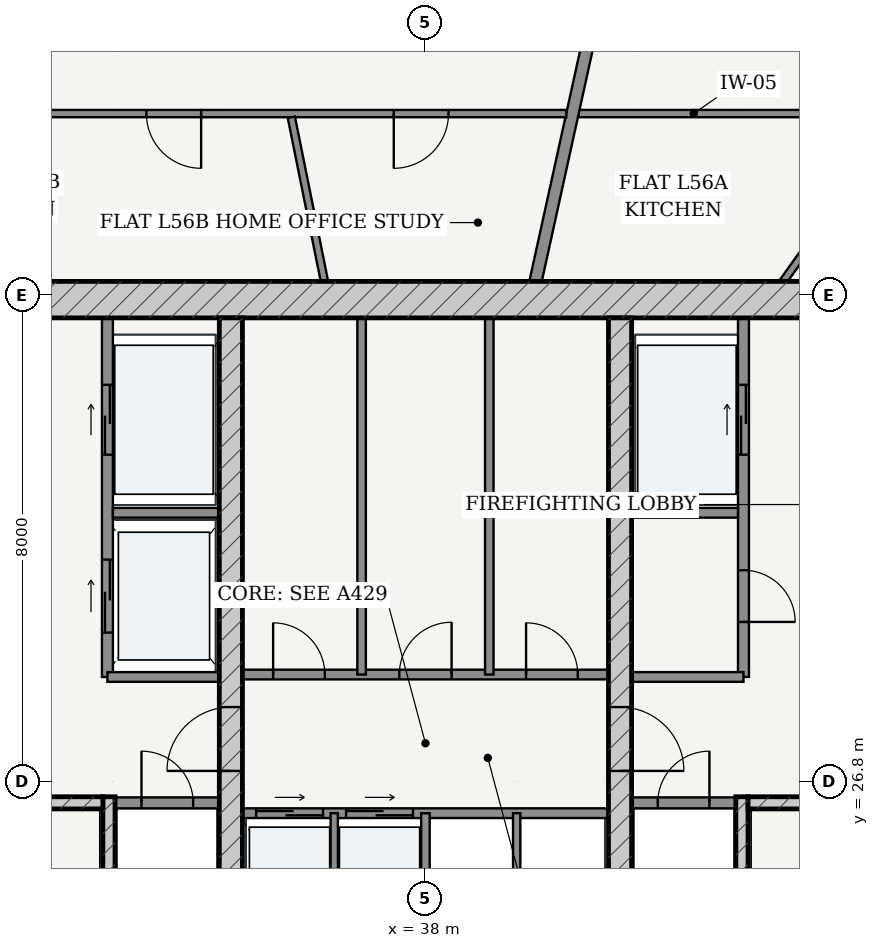
"""IFC4 building model, lengths in metres.
Left out: names, types, materials, properties, quantities, classifications, styles, units other than length and angle.
Written with IfcOpenShell. Run it as: python <this file> out.ifc"""

import sys

from ifc_helpers import new_model, si_unit, direction, frame, frame_2d, origin, place, context, subcontext, project, spatial, rectangle, extrude, source, transform, mapped, element, fill, save


model = new_model("IFC4")
c1 = context("Model", 3, precision=1e-05, world=origin(), true_north=direction((-0.2419218956, 0.970295726276)))
c2 = subcontext(c1, "Body", "Model", "MODEL_VIEW")
j1 = project(units=[si_unit("LENGTHUNIT", "METRE"), si_unit("PLANEANGLEUNIT", "RADIAN")], contexts=[c1])
p1 = place(None, origin())
s1 = spatial("IfcSite", under=j1, at=p1, CompositionType="ELEMENT")
p2 = place(p1, origin())
s2 = spatial("IfcBuilding", under=s1, at=p2, CompositionType="ELEMENT")
p3 = place(p2, frame((0.0, 0.0, 213.4)))
s3 = spatial("IfcBuildingStorey", under=s2, at=p3, CompositionType="ELEMENT", Elevation=213.4)
p4 = place(p3, frame((28.775, 34.725, 0.0), z_axis=(0.0, 0.0, 1.0), x_axis=(1.0, 0.0, 0.0)))
e1 = element("IfcWall", 1, at=p4, inside=s3, PredefinedType="SHEAR", context=c2, shape_type="SweptSolid", body=[
    extrude(rectangle(XDim=18.45, YDim=0.6, at=frame_2d((9.225, 0.0))), origin(), (0.0, 0.0, 1.0), 3.435),
])
p5 = place(p3, frame((32.795, 19.175, 0.0), z_axis=(0.0, 0.0, 1.0), x_axis=(0.0, 1.0, 0.0)))
e2 = element("IfcWall", 2, at=p5, inside=s3, PredefinedType="SOLIDWALL", context=c2, shape_type="SweptSolid", body=[
    extrude(rectangle(XDim=7.375, YDim=0.2, at=frame_2d((3.688, 0.0))), origin(), (0.0, 0.0, 1.0), 3.435),
])
p6 = place(p3, frame((29.375, 26.45, 0.0), z_axis=(0.0, 0.0, 1.0), x_axis=(1.0, 0.0, 0.0)))
e3 = element("IfcWall", 3, at=p6, inside=s3, PredefinedType="SOLIDWALL", context=c2, shape_type="SweptSolid", body=[
    extrude(rectangle(XDim=3.32, YDim=0.2, at=frame_2d((1.66, 0.0))), origin(), (0.0, 0.0, 1.0), 3.435),
])
p7 = place(p6, frame((1.185, 0.0, 0.0)))
e4 = element("IfcOpeningElement", 4, at=p7, cuts=e3, PredefinedType="OPENING", context=c2, shape_type="SweptSolid", body=[
    extrude(rectangle(XDim=0.95, YDim=2.15, at=frame_2d((0.475, 1.075))), frame((0.0, 0.11, 0.0), z_axis=(0.0, -1.0, 0.0), x_axis=(1.0, 0.0, 0.0)), (0.0, 0.0, 1.0), 0.22),
])
p8 = place(p3, frame((43.205, 19.175, 0.0), z_axis=(0.0, 0.0, 1.0), x_axis=(0.0, 1.0, 0.0)))
e5 = element("IfcWall", 5, at=p8, inside=s3, PredefinedType="SOLIDWALL", context=c2, shape_type="SweptSolid", body=[
    extrude(rectangle(XDim=7.375, YDim=0.2, at=frame_2d((3.688, 0.0))), origin(), (0.0, 0.0, 1.0), 3.435),
])
p9 = place(p3, frame((43.305, 26.45, 0.0), z_axis=(0.0, 0.0, 1.0), x_axis=(1.0, 0.0, 0.0)))
e6 = element("IfcWall", 6, at=p9, inside=s3, PredefinedType="SOLIDWALL", context=c2, shape_type="SweptSolid", body=[
    extrude(rectangle(XDim=3.32, YDim=0.2, at=frame_2d((1.66, 0.0))), origin(), (0.0, 0.0, 1.0), 3.435),
])
p10 = place(p9, frame((1.185, 0.0, 0.0)))
e7 = element("IfcOpeningElement", 7, at=p10, cuts=e6, PredefinedType="OPENING", context=c2, shape_type="SweptSolid", body=[
    extrude(rectangle(XDim=0.95, YDim=2.15, at=frame_2d((0.475, 1.075))), frame((0.0, 0.11, 0.0), z_axis=(0.0, -1.0, 0.0), x_axis=(1.0, 0.0, 0.0)), (0.0, 0.0, 1.0), 0.22),
])
p11 = place(p3, frame((34.8, 19.175, 0.0), z_axis=(0.0, 0.0, 1.0), x_axis=(0.0, 1.0, 0.0)))
e8 = element("IfcWall", 8, at=p11, inside=s3, PredefinedType="SHEAR", context=c2, shape_type="SweptSolid", body=[
    extrude(rectangle(XDim=15.25, YDim=0.38, at=frame_2d((7.625, 0.0))), origin(), (0.0, 0.0, 1.0), 3.435),
])
p12 = place(p11, frame((7.8, 0.0, 0.0)))
e9 = element("IfcOpeningElement", 9, at=p12, cuts=e8, PredefinedType="OPENING", context=c2, shape_type="SweptSolid", body=[
    extrude(rectangle(XDim=1.05, YDim=2.15, at=frame_2d((0.525, 1.075))), frame((0.0, 0.2, 0.0), z_axis=(0.0, -1.0, 0.0), x_axis=(1.0, 0.0, 0.0)), (0.0, 0.0, 1.0), 0.4),
])
p13 = place(p3, frame((41.2, 19.175, 0.0), z_axis=(0.0, 0.0, 1.0), x_axis=(0.0, 1.0, 0.0)))
e10 = element("IfcWall", 10, at=p13, inside=s3, PredefinedType="SHEAR", context=c2, shape_type="SweptSolid", body=[
    extrude(rectangle(XDim=15.25, YDim=0.38, at=frame_2d((7.625, 0.0))), origin(), (0.0, 0.0, 1.0), 3.435),
])
p14 = place(p13, frame((7.8, 0.0, 0.0)))
e11 = element("IfcOpeningElement", 11, at=p14, cuts=e10, PredefinedType="OPENING", context=c2, shape_type="SweptSolid", body=[
    extrude(rectangle(XDim=1.05, YDim=2.15, at=frame_2d((0.525, 1.075))), frame((0.0, 0.2, 0.0), z_axis=(0.0, -1.0, 0.0), x_axis=(1.0, 0.0, 0.0)), (0.0, 0.0, 1.0), 0.4),
])
p15 = place(p3, frame((32.9, 26.45, 0.0), z_axis=(0.0, 0.0, 1.0), x_axis=(1.0, 0.0, 0.0)))
e12 = element("IfcWall", 12, at=p15, inside=s3, PredefinedType="PARTITIONING", context=c2, shape_type="SweptSolid", body=[
    extrude(rectangle(XDim=1.71, YDim=0.18, at=frame_2d((0.855, 0.0))), origin(), (0.0, 0.0, 1.0), 3.435),
])
p16 = place(p15, frame((0.43, 0.0, 0.0)))
e13 = element("IfcOpeningElement", 13, at=p16, cuts=e12, PredefinedType="OPENING", context=c2, shape_type="SweptSolid", body=[
    extrude(rectangle(XDim=0.85, YDim=2.1, at=frame_2d((0.425, 1.05))), frame((0.0, 0.1, 0.0), z_axis=(0.0, -1.0, 0.0), x_axis=(1.0, 0.0, 0.0)), (0.0, 0.0, 1.0), 0.2),
])
p17 = place(p3, frame((41.39, 26.45, 0.0), z_axis=(0.0, 0.0, 1.0), x_axis=(1.0, 0.0, 0.0)))
e14 = element("IfcWall", 14, at=p17, inside=s3, PredefinedType="PARTITIONING", context=c2, shape_type="SweptSolid", body=[
    extrude(rectangle(XDim=1.71, YDim=0.18, at=frame_2d((0.855, 0.0))), origin(), (0.0, 0.0, 1.0), 3.435),
])
p18 = place(p17, frame((0.43, 0.0, 0.0)))
e15 = element("IfcOpeningElement", 15, at=p18, cuts=e14, PredefinedType="OPENING", context=c2, shape_type="SweptSolid", body=[
    extrude(rectangle(XDim=0.85, YDim=2.1, at=frame_2d((0.425, 1.05))), frame((0.0, 0.1, 0.0), z_axis=(0.0, -1.0, 0.0), x_axis=(1.0, 0.0, 0.0)), (0.0, 0.0, 1.0), 0.2),
])
p19 = place(p3, frame((32.77, 28.52, 0.0), z_axis=(0.0, 0.0, 1.0), x_axis=(0.0, 1.0, 0.0)))
e16 = element("IfcWall", 16, at=p19, inside=s3, PredefinedType="PARTITIONING", context=c2, shape_type="SweptSolid", body=[
    extrude(rectangle(XDim=5.905, YDim=0.18, at=frame_2d((2.953, 0.0))), origin(), (0.0, 0.0, 1.0), 3.435),
])
p20 = place(p19, frame((3.655, 0.0, 0.0)))
e17 = element("IfcOpeningElement", 17, at=p20, cuts=e16, PredefinedType="OPENING", context=c2, shape_type="SweptSolid", body=[
    extrude(rectangle(XDim=1.15, YDim=2.2, at=frame_2d((0.575, 1.1))), frame((0.0, 0.1, 0.0), z_axis=(0.0, -1.0, 0.0), x_axis=(1.0, 0.0, 0.0)), (0.0, 0.0, 1.0), 0.2),
])
p21 = place(p19, frame((0.73, 0.0, 0.0)))
e18 = element("IfcOpeningElement", 18, at=p21, cuts=e16, PredefinedType="OPENING", context=c2, shape_type="SweptSolid", body=[
    extrude(rectangle(XDim=1.2, YDim=2.25, at=frame_2d((0.6, 1.125))), frame((0.0, 0.1, 0.0), z_axis=(0.0, -1.0, 0.0), x_axis=(1.0, 0.0, 0.0)), (0.0, 0.0, 1.0), 0.2),
])
p22 = place(p3, frame((32.86, 31.22, 0.0), z_axis=(0.0, 0.0, 1.0), x_axis=(1.0, 0.0, 0.0)))
e19 = element("IfcWall", 19, at=p22, inside=s3, PredefinedType="PARTITIONING", context=c2, shape_type="SweptSolid", body=[
    extrude(rectangle(XDim=1.75, YDim=0.16, at=frame_2d((0.875, 0.0))), origin(), (0.0, 0.0, 1.0), 3.435),
])
p23 = place(p3, frame((32.77, 28.52, 0.0), z_axis=(0.0, 0.0, 1.0), x_axis=(1.0, 0.0, 0.0)))
e20 = element("IfcWall", 20, at=p23, inside=s3, PredefinedType="PARTITIONING", context=c2, shape_type="SweptSolid", body=[
    extrude(rectangle(XDim=1.84, YDim=0.16, at=frame_2d((0.92, 0.0))), origin(), (0.0, 0.0, 1.0), 3.435),
])
p24 = place(p3, frame((43.23, 28.52, 0.0), z_axis=(0.0, 0.0, 1.0), x_axis=(0.0, 1.0, 0.0)))
e21 = element("IfcWall", 21, at=p24, inside=s3, PredefinedType="PARTITIONING", context=c2, shape_type="SweptSolid", body=[
    extrude(rectangle(XDim=5.905, YDim=0.18, at=frame_2d((2.953, 0.0))), origin(), (0.0, 0.0, 1.0), 3.435),
])
p25 = place(p24, frame((0.905, 0.0, 0.0)))
e22 = element("IfcOpeningElement", 22, at=p25, cuts=e21, PredefinedType="OPENING", context=c2, shape_type="SweptSolid", body=[
    extrude(rectangle(XDim=0.85, YDim=2.1, at=frame_2d((0.425, 1.05))), frame((0.0, 0.1, 0.0), z_axis=(0.0, -1.0, 0.0), x_axis=(1.0, 0.0, 0.0)), (0.0, 0.0, 1.0), 0.2),
])
p26 = place(p24, frame((3.655, 0.0, 0.0)))
e23 = element("IfcOpeningElement", 23, at=p26, cuts=e21, PredefinedType="OPENING", context=c2, shape_type="SweptSolid", body=[
    extrude(rectangle(XDim=1.15, YDim=2.2, at=frame_2d((0.575, 1.1))), frame((0.0, 0.1, 0.0), z_axis=(0.0, -1.0, 0.0), x_axis=(1.0, 0.0, 0.0)), (0.0, 0.0, 1.0), 0.2),
])
p27 = place(p3, frame((41.39, 31.22, 0.0), z_axis=(0.0, 0.0, 1.0), x_axis=(1.0, 0.0, 0.0)))
e24 = element("IfcWall", 24, at=p27, inside=s3, PredefinedType="PARTITIONING", context=c2, shape_type="SweptSolid", body=[
    extrude(rectangle(XDim=1.75, YDim=0.16, at=frame_2d((0.875, 0.0))), origin(), (0.0, 0.0, 1.0), 3.435),
])
p28 = place(p3, frame((41.39, 28.52, 0.0), z_axis=(0.0, 0.0, 1.0), x_axis=(1.0, 0.0, 0.0)))
e25 = element("IfcWall", 25, at=p28, inside=s3, PredefinedType="PARTITIONING", context=c2, shape_type="SweptSolid", body=[
    extrude(rectangle(XDim=1.84, YDim=0.16, at=frame_2d((0.92, 0.0))), origin(), (0.0, 0.0, 1.0), 3.435),
])
p29 = place(p3, frame((34.99, 28.56, 0.0), z_axis=(0.0, 0.0, 1.0), x_axis=(1.0, 0.0, 0.0)))
e26 = element("IfcWall", 26, at=p29, inside=s3, PredefinedType="PARTITIONING", context=c2, shape_type="SweptSolid", body=[
    extrude(rectangle(XDim=6.02, YDim=0.16, at=frame_2d((3.01, 0.0))), origin(), (0.0, 0.0, 1.0), 3.435),
])
p30 = place(p29, frame((0.505, 0.0, 0.0)))
e27 = element("IfcOpeningElement", 27, at=p30, cuts=e26, PredefinedType="OPENING", context=c2, shape_type="SweptSolid", body=[
    extrude(rectangle(XDim=0.85, YDim=2.1, at=frame_2d((0.425, 1.05))), frame((0.0, 0.09, 0.0), z_axis=(0.0, -1.0, 0.0), x_axis=(1.0, 0.0, 0.0)), (0.0, 0.0, 1.0), 0.18),
])
p31 = place(p29, frame((2.58, 0.0, 0.0)))
e28 = element("IfcOpeningElement", 28, at=p31, cuts=e26, PredefinedType="OPENING", context=c2, shape_type="SweptSolid", body=[
    extrude(rectangle(XDim=0.86, YDim=2.1, at=frame_2d((0.43, 1.05))), frame((0.0, 0.09, 0.0), z_axis=(0.0, -1.0, 0.0), x_axis=(1.0, 0.0, 0.0)), (0.0, 0.0, 1.0), 0.18),
])
p32 = place(p29, frame((4.665, 0.0, 0.0)))
e29 = element("IfcOpeningElement", 29, at=p32, cuts=e26, PredefinedType="OPENING", context=c2, shape_type="SweptSolid", body=[
    extrude(rectangle(XDim=0.85, YDim=2.1, at=frame_2d((0.425, 1.05))), frame((0.0, 0.09, 0.0), z_axis=(0.0, -1.0, 0.0), x_axis=(1.0, 0.0, 0.0)), (0.0, 0.0, 1.0), 0.18),
])
for number, where, z_axis, x_axis in (
    (30, (36.95, 28.56, 0.0), (0.0, 0.0, 1.0), (0.0, 1.0, 0.0)),
    (31, (39.05, 28.56, 0.0), (0.0, 0.0, 1.0), (0.0, 1.0, 0.0)),
):
    element("IfcWall", number, at=place(p3, frame(where, z_axis=z_axis, x_axis=x_axis)), inside=s3, PredefinedType="PARTITIONING", context=c2, shape_type="SweptSolid", body=[
        extrude(rectangle(XDim=5.865, YDim=0.14, at=frame_2d((2.933, 0.0))), origin(), (0.0, 0.0, 1.0), 3.435),
    ])
p33 = place(p3, frame((34.99, 26.28, 0.0), z_axis=(0.0, 0.0, 1.0), x_axis=(1.0, 0.0, 0.0)))
e32 = element("IfcWall", 32, at=p33, inside=s3, PredefinedType="PARTITIONING", context=c2, shape_type="SweptSolid", body=[
    extrude(rectangle(XDim=6.02, YDim=0.16, at=frame_2d((3.01, 0.0))), origin(), (0.0, 0.0, 1.0), 3.435),
])
p34 = place(p33, frame((0.225, 0.0, 0.0)))
e33 = element("IfcOpeningElement", 33, at=p34, cuts=e32, PredefinedType="OPENING", context=c2, shape_type="SweptSolid", body=[
    extrude(rectangle(XDim=1.1, YDim=2.2, at=frame_2d((0.55, 1.1))), frame((0.0, 0.09, 0.0), z_axis=(0.0, -1.0, 0.0), x_axis=(1.0, 0.0, 0.0)), (0.0, 0.0, 1.0), 0.18),
])
p35 = place(p33, frame((1.705, 0.0, 0.0)))
e34 = element("IfcOpeningElement", 34, at=p35, cuts=e32, PredefinedType="OPENING", context=c2, shape_type="SweptSolid", body=[
    extrude(rectangle(XDim=1.1, YDim=2.2, at=frame_2d((0.55, 1.1))), frame((0.0, 0.09, 0.0), z_axis=(0.0, -1.0, 0.0), x_axis=(1.0, 0.0, 0.0)), (0.0, 0.0, 1.0), 0.18),
])
p36 = place(p3, frame((36.5, 23.72, 0.0), z_axis=(0.0, 0.0, 1.0), x_axis=(0.0, 1.0, 0.0)))
e35 = element("IfcWall", 35, at=p36, inside=s3, PredefinedType="PARTITIONING", context=c2, shape_type="SweptSolid", body=[
    extrude(rectangle(XDim=2.56, YDim=0.12, at=frame_2d((1.28, 0.0))), origin(), (0.0, 0.0, 1.0), 3.435),
])
p37 = place(p3, frame((38.0, 23.72, 0.0), z_axis=(0.0, 0.0, 1.0), x_axis=(0.0, 1.0, 0.0)))
e36 = element("IfcWall", 36, at=p37, inside=s3, PredefinedType="PARTITIONING", context=c2, shape_type="SweptSolid", body=[
    extrude(rectangle(XDim=2.56, YDim=0.14, at=frame_2d((1.28, 0.0))), origin(), (0.0, 0.0, 1.0), 3.435),
])
p38 = place(p3, frame((39.5, 23.72, 0.0), z_axis=(0.0, 0.0, 1.0), x_axis=(0.0, 1.0, 0.0)))
e37 = element("IfcWall", 37, at=p38, inside=s3, PredefinedType="PARTITIONING", context=c2, shape_type="SweptSolid", body=[
    extrude(rectangle(XDim=2.56, YDim=0.12, at=frame_2d((1.28, 0.0))), origin(), (0.0, 0.0, 1.0), 3.435),
])
p39 = place(p3, frame((40.52, 37.785, 0.0), z_axis=(0.0, 0.0, 1.0), x_axis=(1.0, 0.0, 0.0)))
e38 = element("IfcWall", 38, at=p39, inside=s3, PredefinedType="PARTITIONING", context=c2, shape_type="SweptSolid", body=[
    extrude(rectangle(XDim=3.785, YDim=0.12, at=frame_2d((1.893, 0.0))), origin(), (0.0, 0.0, 1.0), 2.951),
])
p40 = place(p3, frame((43.885, 35.027, 0.0), z_axis=(0.0, 0.0, 1.0), x_axis=(0.581801309538, 0.813330951225, 0.0)))
e39 = element("IfcWall", 39, at=p40, inside=s3, PredefinedType="PARTITIONING", context=c2, shape_type="SweptSolid", body=[
    extrude(rectangle(XDim=3.526, YDim=0.12, at=frame_2d((1.763, 0.0))), origin(), (0.0, 0.0, 1.0), 3.435),
])
p41 = place(p40, frame((1.313, 0.0, 0.0)))
e40 = element("IfcOpeningElement", 40, at=p41, cuts=e39, PredefinedType="OPENING", context=c2, shape_type="SweptSolid", body=[
    extrude(rectangle(XDim=0.9, YDim=2.15, at=frame_2d((0.45, 1.075))), frame((0.0, 0.07, 0.0), z_axis=(0.0, -1.0, 0.0), x_axis=(1.0, 0.0, 0.0)), (0.0, 0.0, 1.0), 0.14),
])
p42 = place(p3, frame((39.811, 35.027, 0.0), z_axis=(0.0, 0.0, 1.0), x_axis=(0.214966857327, 0.976621344356, 0.0)))
e41 = element("IfcWall", 41, at=p42, inside=s3, PredefinedType="PARTITIONING", context=c2, shape_type="SweptSolid", body=[
    extrude(rectangle(XDim=11.258, YDim=0.2, at=frame_2d((5.629, 0.0))), origin(), (0.0, 0.0, 1.0), 2.52),
])
p43 = place(p3, frame((31.695, 37.785, 0.0), z_axis=(0.0, 0.0, 1.0), x_axis=(1.0, 0.0, 0.0)))
e42 = element("IfcWall", 42, at=p43, inside=s3, PredefinedType="PARTITIONING", context=c2, shape_type="SweptSolid", body=[
    extrude(rectangle(XDim=8.621, YDim=0.12, at=frame_2d((4.311, 0.0))), origin(), (0.0, 0.0, 1.0), 2.951),
])
p44 = place(p43, frame((1.716, 0.0, 0.0)))
e43 = element("IfcOpeningElement", 43, at=p44, cuts=e42, PredefinedType="OPENING", context=c2, shape_type="SweptSolid", body=[
    extrude(rectangle(XDim=0.9, YDim=2.15, at=frame_2d((0.45, 1.075))), frame((0.0, 0.07, 0.0), z_axis=(0.0, -1.0, 0.0), x_axis=(1.0, 0.0, 0.0)), (0.0, 0.0, 1.0), 0.14),
])
p45 = place(p43, frame((5.784, 0.0, 0.0)))
e44 = element("IfcOpeningElement", 44, at=p45, cuts=e42, PredefinedType="OPENING", context=c2, shape_type="SweptSolid", body=[
    extrude(rectangle(XDim=0.9, YDim=2.15, at=frame_2d((0.45, 1.075))), frame((0.0, 0.07, 0.0), z_axis=(0.0, -1.0, 0.0), x_axis=(1.0, 0.0, 0.0)), (0.0, 0.0, 1.0), 0.14),
])
p46 = place(p3, frame((36.339, 35.027, 0.0), z_axis=(0.0, 0.0, 1.0), x_axis=(-0.197856196381, 0.980231057228, 0.0)))
e45 = element("IfcWall", 45, at=p46, inside=s3, PredefinedType="PARTITIONING", context=c2, shape_type="SweptSolid", body=[
    extrude(rectangle(XDim=2.752, YDim=0.12, at=frame_2d((1.376, 0.0))), origin(), (0.0, 0.0, 1.0), 2.52),
])
m1 = source(origin(), c2, "Body", "SweptSolid", [
    extrude(rectangle(XDim=1.05, YDim=2.15, at=frame_2d((0.525, 1.075))), frame((0.0, 0.025, 0.0), z_axis=(0.0, -1.0, 0.0), x_axis=(1.0, 0.0, 0.0)), (0.0, 0.0, 1.0), 0.05),
])
p47 = place(p12, origin())
e46 = element("IfcDoor", 46, at=p47, inside=s3, OperationType="SINGLE_SWING_LEFT", PredefinedType="DOOR", context=c2, shape_type="MappedRepresentation", body=[
    mapped(m1, transform((0.0, 0.0, 0.0), scale=1.0)),
])
fill(e9, e46)
p48 = place(p14, frame((1.05, 0.0, 0.0), z_axis=(0.0, 0.0, 1.0), x_axis=(-1.0, 0.0, 0.0)))
e47 = element("IfcDoor", 47, at=p48, inside=s3, OperationType="SINGLE_SWING_RIGHT", PredefinedType="DOOR", context=c2, shape_type="MappedRepresentation", body=[
    mapped(m1, transform((0.0, 0.0, 0.0), scale=1.0)),
])
fill(e11, e47)
m2 = source(origin(), c2, "Body", "SweptSolid", [
    extrude(rectangle(XDim=0.85, YDim=2.1, at=frame_2d((0.425, 1.05))), frame((0.0, 0.025, 0.0), z_axis=(0.0, -1.0, 0.0), x_axis=(1.0, 0.0, 0.0)), (0.0, 0.0, 1.0), 0.05),
])
p49 = place(p16, origin())
e48 = element("IfcDoor", 48, at=p49, inside=s3, OperationType="SINGLE_SWING_LEFT", PredefinedType="DOOR", context=c2, shape_type="MappedRepresentation", body=[
    mapped(m2, transform((0.0, 0.0, 0.0), scale=1.0)),
])
fill(e13, e48)
p50 = place(p18, origin())
e49 = element("IfcDoor", 49, at=p50, inside=s3, OperationType="SINGLE_SWING_RIGHT", PredefinedType="DOOR", context=c2, shape_type="MappedRepresentation", body=[
    mapped(m2, transform((0.0, 0.0, 0.0), scale=1.0)),
])
fill(e15, e49)
p51 = place(p25, frame((0.85, 0.0, 0.0), z_axis=(0.0, 0.0, 1.0), x_axis=(-1.0, 0.0, 0.0)))
e50 = element("IfcDoor", 50, at=p51, inside=s3, OperationType="SINGLE_SWING_RIGHT", PredefinedType="DOOR", context=c2, shape_type="MappedRepresentation", body=[
    mapped(m2, transform((0.0, 0.0, 0.0), scale=1.0)),
])
fill(e22, e50)
p52 = place(p30, origin())
e51 = element("IfcDoor", 51, at=p52, inside=s3, OperationType="SINGLE_SWING_LEFT", PredefinedType="DOOR", context=c2, shape_type="MappedRepresentation", body=[
    mapped(m2, transform((0.0, 0.0, 0.0), scale=1.0)),
])
fill(e27, e51)
m3 = source(origin(), c2, "Body", "SweptSolid", [
    extrude(rectangle(XDim=0.86, YDim=2.1, at=frame_2d((0.43, 1.05))), frame((0.0, 0.025, 0.0), z_axis=(0.0, -1.0, 0.0), x_axis=(1.0, 0.0, 0.0)), (0.0, 0.0, 1.0), 0.05),
])
p53 = place(p31, origin())
e52 = element("IfcDoor", 52, at=p53, inside=s3, OperationType="SINGLE_SWING_RIGHT", PredefinedType="DOOR", context=c2, shape_type="MappedRepresentation", body=[
    mapped(m3, transform((0.0, 0.0, 0.0), scale=1.0)),
])
fill(e28, e52)
p54 = place(p32, origin())
e53 = element("IfcDoor", 53, at=p54, inside=s3, OperationType="SINGLE_SWING_LEFT", PredefinedType="DOOR", context=c2, shape_type="MappedRepresentation", body=[
    mapped(m2, transform((0.0, 0.0, 0.0), scale=1.0)),
])
fill(e29, e53)
m4 = source(origin(), c2, "Body", "SweptSolid", [
    extrude(rectangle(XDim=1.15, YDim=2.2, at=frame_2d((0.575, 1.1))), frame((0.0, 0.025, 0.0), z_axis=(0.0, -1.0, 0.0), x_axis=(1.0, 0.0, 0.0)), (0.0, 0.0, 1.0), 0.05),
])
p55 = place(p20, origin())
e54 = element("IfcDoor", 54, at=p55, inside=s3, OperationType="DOUBLE_DOOR_SLIDING", PredefinedType="DOOR", context=c2, shape_type="MappedRepresentation", body=[
    mapped(m4, transform((0.0, 0.0, 0.0), scale=1.0)),
])
fill(e17, e54)
p56 = place(p26, origin())
e55 = element("IfcDoor", 55, at=p56, inside=s3, OperationType="DOUBLE_DOOR_SLIDING", PredefinedType="DOOR", context=c2, shape_type="MappedRepresentation", body=[
    mapped(m4, transform((0.0, 0.0, 0.0), scale=1.0)),
])
fill(e23, e55)
m5 = source(origin(), c2, "Body", "SweptSolid", [
    extrude(rectangle(XDim=1.2, YDim=2.25, at=frame_2d((0.6, 1.125))), frame((0.0, 0.025, 0.0), z_axis=(0.0, -1.0, 0.0), x_axis=(1.0, 0.0, 0.0)), (0.0, 0.0, 1.0), 0.05),
])
p57 = place(p21, origin())
e56 = element("IfcDoor", 56, at=p57, inside=s3, OperationType="DOUBLE_DOOR_SLIDING", PredefinedType="DOOR", context=c2, shape_type="MappedRepresentation", body=[
    mapped(m5, transform((0.0, 0.0, 0.0), scale=1.0)),
])
fill(e18, e56)
m6 = source(origin(), c2, "Body", "SweptSolid", [
    extrude(rectangle(XDim=1.1, YDim=2.2, at=frame_2d((0.55, 1.1))), frame((0.0, 0.025, 0.0), z_axis=(0.0, -1.0, 0.0), x_axis=(1.0, 0.0, 0.0)), (0.0, 0.0, 1.0), 0.05),
])
p58 = place(p34, origin())
e57 = element("IfcDoor", 57, at=p58, inside=s3, OperationType="DOUBLE_DOOR_SLIDING", PredefinedType="DOOR", context=c2, shape_type="MappedRepresentation", body=[
    mapped(m6, transform((0.0, 0.0, 0.0), scale=1.0)),
])
fill(e33, e57)
p59 = place(p35, origin())
e58 = element("IfcDoor", 58, at=p59, inside=s3, OperationType="DOUBLE_DOOR_SLIDING", PredefinedType="DOOR", context=c2, shape_type="MappedRepresentation", body=[
    mapped(m6, transform((0.0, 0.0, 0.0), scale=1.0)),
])
fill(e34, e58)
m7 = source(origin(), c2, "Body", "SweptSolid", [
    extrude(rectangle(XDim=0.9, YDim=2.15, at=frame_2d((0.45, 1.075))), frame((0.0, 0.025, 0.0), z_axis=(0.0, -1.0, 0.0), x_axis=(1.0, 0.0, 0.0)), (0.0, 0.0, 1.0), 0.05),
])
p60 = place(p44, frame((0.9, 0.0, 0.0), z_axis=(0.0, 0.0, 1.0), x_axis=(-1.0, 0.0, 0.0)))
e59 = element("IfcDoor", 59, at=p60, inside=s3, OperationType="SINGLE_SWING_LEFT", PredefinedType="DOOR", context=c2, shape_type="MappedRepresentation", body=[
    mapped(m7, transform((0.0, 0.0, 0.0), scale=1.0)),
])
fill(e43, e59)
p61 = place(p45, frame((0.9, 0.0, 0.0), z_axis=(0.0, 0.0, 1.0), x_axis=(-1.0, 0.0, 0.0)))
e60 = element("IfcDoor", 60, at=p61, inside=s3, OperationType="SINGLE_SWING_RIGHT", PredefinedType="DOOR", context=c2, shape_type="MappedRepresentation", body=[
    mapped(m7, transform((0.0, 0.0, 0.0), scale=1.0)),
])
fill(e44, e60)
save(model, sys.argv[1])
